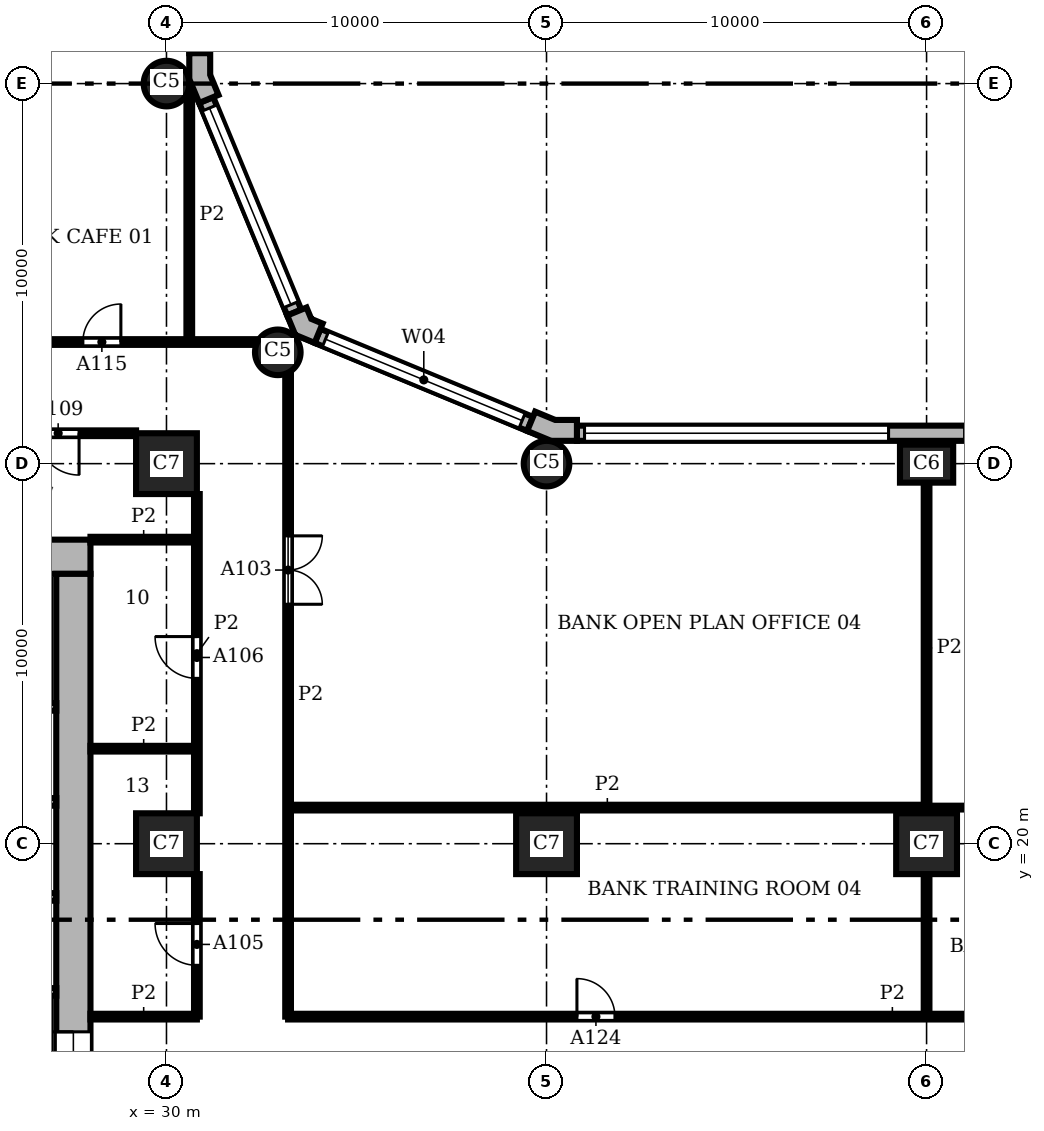
"""IFC4 building model, lengths in metres.
Left out: names, types, materials, properties, quantities, classifications, styles, units other than length and angle.
Written with IfcOpenShell. Run it as: python <this file> out.ifc"""

import sys

from ifc_helpers import new_model, si_unit, direction, frame, frame_2d, origin, origin_2d, place, context, subcontext, project, spatial, polyline, rectangle, circle, outline, extrude, element, fill, save


model = new_model("IFC4")
c1 = context("Model", 3, precision=1e-05, world=origin(), true_north=direction((0.0, 1.0)))
c2 = subcontext(c1, "Body", "Model", "MODEL_VIEW")
j1 = project(units=[si_unit("LENGTHUNIT", "METRE"), si_unit("PLANEANGLEUNIT", "RADIAN")], contexts=[c1])
p1 = place(None, origin())
s1 = spatial("IfcSite", under=j1, at=p1, CompositionType="ELEMENT")
p2 = place(p1, origin())
s2 = spatial("IfcBuilding", under=s1, at=p2, CompositionType="ELEMENT")
p3 = place(p2, frame((0.0, 0.0, 12.0)))
s3 = spatial("IfcBuildingStorey", under=s2, at=p3, CompositionType="ELEMENT", Elevation=12.0)
p4 = place(p3, frame((50.0, 30.0, 0.0), z_axis=(0.0, 0.0, 1.0), x_axis=(1.0, 0.0, 0.0)))
e1 = element("IfcColumn", 1, at=p4, inside=s3, PredefinedType="COLUMN", context=c2, shape_type="SweptSolid", body=[
    extrude(rectangle(XDim=1.4, YDim=1.0, at=origin_2d()), origin(), (0.0, 0.0, 1.0), 3.9),
])
for number, where, z_axis, x_axis in (
    (2, (40.0, 30.0, 0.0), (0.0, 0.0, 1.0), (1.0, 0.0, 0.0)),
    (3, (32.929, 32.929, 0.0), (0.0, 0.0, 1.0), (1.0, 0.0, 0.0)),
    (4, (30.0, 40.0, 0.0), (0.0, 0.0, 1.0), (1.0, 0.0, 0.0)),
):
    element("IfcColumn", number, at=place(p3, frame(where, z_axis=z_axis, x_axis=x_axis)), inside=s3, PredefinedType="COLUMN", context=c2, shape_type="SweptSolid", body=[
        extrude(circle(Radius=0.6, at=origin_2d()), origin(), (0.0, 0.0, 1.0), 3.9),
    ])
for number, where, z_axis, x_axis in (
    (5, (30.0, 20.0, 0.0), (0.0, 0.0, 1.0), (1.0, 0.0, 0.0)),
    (6, (30.0, 30.0, 0.0), (0.0, 0.0, 1.0), (1.0, 0.0, 0.0)),
    (7, (40.0, 20.0, 0.0), (0.0, 0.0, 1.0), (1.0, 0.0, 0.0)),
    (8, (50.0, 20.0, 0.0), (0.0, 0.0, 1.0), (1.0, 0.0, 0.0)),
):
    element("IfcColumn", number, at=place(p3, frame(where, z_axis=z_axis, x_axis=x_axis)), inside=s3, PredefinedType="COLUMN", context=c2, shape_type="SweptSolid", body=[
        extrude(rectangle(XDim=1.6, YDim=1.6, at=origin_2d()), origin(), (0.0, 0.0, 1.0), 3.9),
    ])
p5 = place(p3, frame((27.55, 8.9, 0.0), z_axis=(0.0, 0.0, 1.0), x_axis=(0.0, 1.0, 0.0)))
e9 = element("IfcWall", 9, at=p5, inside=s3, PredefinedType="SHEAR", context=c2, shape_type="SweptSolid", body=[
    extrude(rectangle(XDim=18.2, YDim=0.9, at=frame_2d((9.1, 0.0))), origin(), (0.0, 0.0, 1.0), 3.9),
])
p6 = place(p5, frame((4.55, 0.0, 0.0)))
e10 = element("IfcOpeningElement", 10, at=p6, cuts=e9, PredefinedType="OPENING", context=c2, shape_type="SweptSolid", body=[
    extrude(rectangle(XDim=1.6, YDim=2.1, at=frame_2d((0.8, 1.05))), frame((0.0, 0.46, 0.0), z_axis=(0.0, -1.0, 0.0), x_axis=(1.0, 0.0, 0.0)), (0.0, 0.0, 1.0), 0.92),
])
p7 = place(p3, frame((28.0, 27.55, 0.0), z_axis=(0.0, 0.0, 1.0), x_axis=(-1.0, 0.0, 0.0)))
e11 = element("IfcWall", 11, at=p7, inside=s3, PredefinedType="SHEAR", context=c2, shape_type="SweptSolid", body=[
    extrude(rectangle(XDim=20.0, YDim=0.9, at=frame_2d((10.0, 0.0))), origin(), (0.0, 0.0, 1.0), 3.9),
])
p8 = place(p3, origin())
e12 = element("IfcWall", 12, at=p8, inside=s3, PredefinedType="SOLIDWALL", context=c2, shape_type="SweptSolid", body=[
    extrude(outline(polyline([(40.8, 31.0), (40.8, 31.15), (40.229, 31.15), (39.701, 31.369), (39.644, 31.23), (39.49, 30.861), (40.119, 30.6), (40.8, 30.6), (40.8, 31.0)])), origin(), (0.0, 0.0, 1.0), 3.9),
])
e13 = element("IfcWall", 13, at=p8, inside=s3, PredefinedType="SOLIDWALL", context=c2, shape_type="SweptSolid", body=[
    extrude(outline(polyline([(34.051, 33.547), (34.108, 33.685), (33.809, 33.809), (33.685, 34.108), (33.547, 34.051), (33.177, 33.898), (33.388, 33.388), (33.898, 33.177), (34.051, 33.547)])), origin(), (0.0, 0.0, 1.0), 3.9),
])
e14 = element("IfcWall", 14, at=p8, inside=s3, PredefinedType="SOLIDWALL", context=c2, shape_type="SweptSolid", body=[
    extrude(outline(polyline([(31.23, 39.644), (31.369, 39.701), (31.15, 40.229), (31.15, 40.8), (31.0, 40.8), (30.6, 40.8), (30.6, 40.119), (30.861, 39.49), (31.23, 39.644)])), origin(), (0.0, 0.0, 1.0), 3.9),
])
p9 = place(p3, frame((69.2, 30.8, 0.0), z_axis=(0.0, 0.0, 1.0), x_axis=(-1.0, 0.0, 0.0)))
e15 = element("IfcWall", 15, at=p9, inside=s3, PredefinedType="SOLIDWALL", context=c2, shape_type="SweptSolid", body=[
    extrude(rectangle(XDim=28.4, YDim=0.4, at=frame_2d((14.2, 0.0))), origin(), (0.0, 0.0, 1.0), 3.9),
])
p10 = place(p9, frame((0.2, 0.0, 0.9)))
e16 = element("IfcOpeningElement", 16, at=p10, cuts=e15, PredefinedType="OPENING", context=c2, shape_type="SweptSolid", body=[
    extrude(rectangle(XDim=8.0, YDim=2.35, at=frame_2d((4.0, 1.175))), frame((0.0, 0.21, 0.0), z_axis=(0.0, -1.0, 0.0), x_axis=(1.0, 0.0, 0.0)), (0.0, 0.0, 1.0), 0.42),
])
p11 = place(p9, frame((10.2, 0.0, 0.9)))
e17 = element("IfcOpeningElement", 17, at=p11, cuts=e15, PredefinedType="OPENING", context=c2, shape_type="SweptSolid", body=[
    extrude(rectangle(XDim=8.0, YDim=2.35, at=frame_2d((4.0, 1.175))), frame((0.0, 0.21, 0.0), z_axis=(0.0, -1.0, 0.0), x_axis=(1.0, 0.0, 0.0)), (0.0, 0.0, 1.0), 0.42),
])
p12 = place(p9, frame((20.2, 0.0, 0.9)))
e18 = element("IfcOpeningElement", 18, at=p12, cuts=e15, PredefinedType="OPENING", context=c2, shape_type="SweptSolid", body=[
    extrude(rectangle(XDim=8.0, YDim=2.35, at=frame_2d((4.0, 1.175))), frame((0.0, 0.21, 0.0), z_axis=(0.0, -1.0, 0.0), x_axis=(1.0, 0.0, 0.0)), (0.0, 0.0, 1.0), 0.42),
])
p13 = place(p3, frame((39.567, 31.045, 0.0), z_axis=(0.0, 0.0, 1.0), x_axis=(-0.923891000409, 0.382655745237, 0.0)))
e19 = element("IfcWall", 19, at=p13, inside=s3, PredefinedType="SOLIDWALL", context=c2, shape_type="SweptSolid", body=[
    extrude(rectangle(XDim=6.053, YDim=0.4, at=frame_2d((3.027, 0.0))), origin(), (0.0, 0.0, 1.0), 3.9),
])
p14 = place(p13, frame((0.227, 0.0, 0.9)))
e20 = element("IfcOpeningElement", 20, at=p14, cuts=e19, PredefinedType="OPENING", context=c2, shape_type="SweptSolid", body=[
    extrude(rectangle(XDim=5.6, YDim=2.35, at=frame_2d((2.8, 1.175))), frame((0.0, 0.21, 0.0), z_axis=(0.0, -1.0, 0.0), x_axis=(1.0, 0.0, 0.0)), (0.0, 0.0, 1.0), 0.42),
])
p15 = place(p3, frame((33.362, 33.974, 0.0), z_axis=(0.0, 0.0, 1.0), x_axis=(-0.382655745237, 0.923891000409, 0.0)))
e21 = element("IfcWall", 21, at=p15, inside=s3, PredefinedType="SOLIDWALL", context=c2, shape_type="SweptSolid", body=[
    extrude(rectangle(XDim=6.053, YDim=0.4, at=frame_2d((3.027, 0.0))), origin(), (0.0, 0.0, 1.0), 3.9),
])
p16 = place(p15, frame((0.227, 0.0, 0.9)))
e22 = element("IfcOpeningElement", 22, at=p16, cuts=e21, PredefinedType="OPENING", context=c2, shape_type="SweptSolid", body=[
    extrude(rectangle(XDim=5.6, YDim=2.35, at=frame_2d((2.8, 1.175))), frame((0.0, 0.21, 0.0), z_axis=(0.0, -1.0, 0.0), x_axis=(1.0, 0.0, 0.0)), (0.0, 0.0, 1.0), 0.42),
])
p17 = place(p3, frame((30.8, 40.8, 0.0), z_axis=(0.0, 0.0, 1.0), x_axis=(0.0, 1.0, 0.0)))
e23 = element("IfcWall", 23, at=p17, inside=s3, PredefinedType="SOLIDWALL", context=c2, shape_type="SweptSolid", body=[
    extrude(rectangle(XDim=18.4, YDim=0.4, at=frame_2d((9.2, 0.0))), origin(), (0.0, 0.0, 1.0), 3.9),
])
p18 = place(p17, frame((0.2, 0.0, 0.9)))
e24 = element("IfcOpeningElement", 24, at=p18, cuts=e23, PredefinedType="OPENING", context=c2, shape_type="SweptSolid", body=[
    extrude(rectangle(XDim=8.0, YDim=2.35, at=frame_2d((4.0, 1.175))), frame((0.0, 0.21, 0.0), z_axis=(0.0, -1.0, 0.0), x_axis=(1.0, 0.0, 0.0)), (0.0, 0.0, 1.0), 0.42),
])
p19 = place(p17, frame((10.2, 0.0, 0.9)))
e25 = element("IfcOpeningElement", 25, at=p19, cuts=e23, PredefinedType="OPENING", context=c2, shape_type="SweptSolid", body=[
    extrude(rectangle(XDim=8.0, YDim=2.35, at=frame_2d((4.0, 1.175))), frame((0.0, 0.21, 0.0), z_axis=(0.0, -1.0, 0.0), x_axis=(1.0, 0.0, 0.0)), (0.0, 0.0, 1.0), 0.42),
])
for number, where, z_axis, x_axis in (
    (26, (24.3, 16.1, 0.0), (0.0, 0.0, 1.0), (1.0, 0.0, 0.0)),
    (27, (24.3, 18.6, 0.0), (0.0, 0.0, 1.0), (1.0, 0.0, 0.0)),
    (28, (24.3, 21.1, 0.0), (0.0, 0.0, 1.0), (1.0, 0.0, 0.0)),
):
    element("IfcWall", number, at=place(p3, frame(where, z_axis=z_axis, x_axis=x_axis)), inside=s3, PredefinedType="SHEAR", context=c2, shape_type="SweptSolid", body=[
        extrude(rectangle(XDim=2.8, YDim=0.2, at=frame_2d((1.4, 0.0))), origin(), (0.0, 0.0, 1.0), 3.58),
    ])
p20 = place(p3, frame((13.8, 23.6, 0.0), z_axis=(0.0, 0.0, 1.0), x_axis=(1.0, 0.0, 0.0)))
e29 = element("IfcWall", 29, at=p20, inside=s3, PredefinedType="SHEAR", context=c2, shape_type="SweptSolid", body=[
    extrude(rectangle(XDim=13.3, YDim=0.2, at=frame_2d((6.65, 0.0))), origin(), (0.0, 0.0, 1.0), 3.58),
])
p21 = place(p20, frame((2.4, 0.0, 0.0)))
e30 = element("IfcOpeningElement", 30, at=p21, cuts=e29, PredefinedType="OPENING", context=c2, shape_type="SweptSolid", body=[
    extrude(rectangle(XDim=1.1, YDim=2.1, at=frame_2d((0.55, 1.05))), frame((0.0, 0.11, 0.0), z_axis=(0.0, -1.0, 0.0), x_axis=(1.0, 0.0, 0.0)), (0.0, 0.0, 1.0), 0.22),
])
p22 = place(p20, frame((4.9, 0.0, 0.0)))
e31 = element("IfcOpeningElement", 31, at=p22, cuts=e29, PredefinedType="OPENING", context=c2, shape_type="SweptSolid", body=[
    extrude(rectangle(XDim=1.1, YDim=2.1, at=frame_2d((0.55, 1.05))), frame((0.0, 0.11, 0.0), z_axis=(0.0, -1.0, 0.0), x_axis=(1.0, 0.0, 0.0)), (0.0, 0.0, 1.0), 0.22),
])
p23 = place(p20, frame((0.25, 0.0, 0.0)))
e32 = element("IfcOpeningElement", 32, at=p23, cuts=e29, PredefinedType="OPENING", context=c2, shape_type="SweptSolid", body=[
    extrude(rectangle(XDim=1.0, YDim=2.1, at=frame_2d((0.5, 1.05))), frame((0.0, 0.11, 0.0), z_axis=(0.0, -1.0, 0.0), x_axis=(1.0, 0.0, 0.0)), (0.0, 0.0, 1.0), 0.22),
])
p24 = place(p3, frame((50.0, 20.95, 0.0), z_axis=(0.0, 0.0, 1.0), x_axis=(1.0, 0.0, 0.0)))
e33 = element("IfcWall", 33, at=p24, inside=s3, PredefinedType="PARTITIONING", context=c2, shape_type="SweptSolid", body=[
    extrude(rectangle(XDim=10.0, YDim=0.1, at=frame_2d((5.0, 0.0))), origin(), (0.0, 0.0, 1.0), 3.58),
])
p25 = place(p24, frame((4.625, 0.0, 0.0)))
e34 = element("IfcOpeningElement", 34, at=p25, cuts=e33, PredefinedType="OPENING", context=c2, shape_type="SweptSolid", body=[
    extrude(rectangle(XDim=0.95, YDim=2.1, at=frame_2d((0.475, 1.05))), frame((0.0, 0.06, 0.0), z_axis=(0.0, -1.0, 0.0), x_axis=(1.0, 0.0, 0.0)), (0.0, 0.0, 1.0), 0.12),
])
p26 = place(p3, frame((30.6, 33.2, 0.0), z_axis=(0.0, 0.0, 1.0), x_axis=(0.0, 1.0, 0.0)))
e35 = element("IfcWall", 35, at=p26, inside=s3, PredefinedType="PARTITIONING", context=c2, shape_type="SweptSolid", body=[
    extrude(rectangle(XDim=6.699, YDim=0.15, at=frame_2d((3.35, 0.0))), origin(), (0.0, 0.0, 1.0), 3.58),
])
p27 = place(p3, frame((30.8, 15.45, 0.0), z_axis=(0.0, 0.0, 1.0), x_axis=(0.0, 1.0, 0.0)))
e36 = element("IfcWall", 36, at=p27, inside=s3, PredefinedType="PARTITIONING", context=c2, shape_type="SweptSolid", body=[
    extrude(rectangle(XDim=3.75, YDim=0.15, at=frame_2d((1.875, 0.0))), origin(), (0.0, 0.0, 1.0), 3.58),
])
p28 = place(p27, frame((1.35, 0.0, 0.0)))
e37 = element("IfcOpeningElement", 37, at=p28, cuts=e36, PredefinedType="OPENING", context=c2, shape_type="SweptSolid", body=[
    extrude(rectangle(XDim=1.1, YDim=2.1, at=frame_2d((0.55, 1.05))), frame((0.0, 0.085, 0.0), z_axis=(0.0, -1.0, 0.0), x_axis=(1.0, 0.0, 0.0)), (0.0, 0.0, 1.0), 0.17),
])
p29 = place(p3, frame((30.8, 20.8, 0.0), z_axis=(0.0, 0.0, 1.0), x_axis=(0.0, 1.0, 0.0)))
e38 = element("IfcWall", 38, at=p29, inside=s3, PredefinedType="PARTITIONING", context=c2, shape_type="SweptSolid", body=[
    extrude(rectangle(XDim=8.4, YDim=0.15, at=frame_2d((4.2, 0.0))), origin(), (0.0, 0.0, 1.0), 3.58),
])
p30 = place(p29, frame((3.55, 0.0, 0.0)))
e39 = element("IfcOpeningElement", 39, at=p30, cuts=e38, PredefinedType="OPENING", context=c2, shape_type="SweptSolid", body=[
    extrude(rectangle(XDim=1.1, YDim=2.1, at=frame_2d((0.55, 1.05))), frame((0.0, 0.085, 0.0), z_axis=(0.0, -1.0, 0.0), x_axis=(1.0, 0.0, 0.0)), (0.0, 0.0, 1.0), 0.17),
])
p31 = place(p3, frame((33.2, 15.45, 0.0), z_axis=(0.0, 0.0, 1.0), x_axis=(0.0, 1.0, 0.0)))
e40 = element("IfcWall", 40, at=p31, inside=s3, PredefinedType="PARTITIONING", context=c2, shape_type="SweptSolid", body=[
    extrude(rectangle(XDim=16.912, YDim=0.15, at=frame_2d((8.456, 0.0))), origin(), (0.0, 0.0, 1.0), 3.58),
])
p32 = place(p31, frame((10.85, 0.0, 0.0)))
e41 = element("IfcOpeningElement", 41, at=p32, cuts=e40, PredefinedType="OPENING", context=c2, shape_type="SweptSolid", body=[
    extrude(rectangle(XDim=1.8, YDim=2.1, at=frame_2d((0.9, 1.05))), frame((0.0, 0.085, 0.0), z_axis=(0.0, -1.0, 0.0), x_axis=(1.0, 0.0, 0.0)), (0.0, 0.0, 1.0), 0.17),
])
p33 = place(p3, frame((50.0, 15.45, 0.0), z_axis=(0.0, 0.0, 1.0), x_axis=(0.0, 1.0, 0.0)))
e42 = element("IfcWall", 42, at=p33, inside=s3, PredefinedType="PARTITIONING", context=c2, shape_type="SweptSolid", body=[
    extrude(rectangle(XDim=3.75, YDim=0.15, at=frame_2d((1.875, 0.0))), origin(), (0.0, 0.0, 1.0), 3.58),
])
p34 = place(p3, frame((50.0, 20.8, 0.0), z_axis=(0.0, 0.0, 1.0), x_axis=(0.0, 1.0, 0.0)))
e43 = element("IfcWall", 43, at=p34, inside=s3, PredefinedType="PARTITIONING", context=c2, shape_type="SweptSolid", body=[
    extrude(rectangle(XDim=8.7, YDim=0.15, at=frame_2d((4.35, 0.0))), origin(), (0.0, 0.0, 1.0), 3.58),
])
p35 = place(p3, frame((28.0, 15.45, 0.0), z_axis=(0.0, 0.0, 1.0), x_axis=(1.0, 0.0, 0.0)))
e44 = element("IfcWall", 44, at=p35, inside=s3, PredefinedType="PARTITIONING", context=c2, shape_type="SweptSolid", body=[
    extrude(rectangle(XDim=2.8, YDim=0.15, at=frame_2d((1.4, 0.0))), origin(), (0.0, 0.0, 1.0), 3.58),
])
p36 = place(p3, frame((33.2, 15.45, 0.0), z_axis=(0.0, 0.0, 1.0), x_axis=(1.0, 0.0, 0.0)))
e45 = element("IfcWall", 45, at=p36, inside=s3, PredefinedType="PARTITIONING", context=c2, shape_type="SweptSolid", body=[
    extrude(rectangle(XDim=31.8, YDim=0.15, at=frame_2d((15.9, 0.0))), origin(), (0.0, 0.0, 1.0), 3.58),
])
p37 = place(p36, frame((7.6, 0.0, 0.0)))
e46 = element("IfcOpeningElement", 46, at=p37, cuts=e45, PredefinedType="OPENING", context=c2, shape_type="SweptSolid", body=[
    extrude(rectangle(XDim=1.0, YDim=2.1, at=frame_2d((0.5, 1.05))), frame((0.0, 0.085, 0.0), z_axis=(0.0, -1.0, 0.0), x_axis=(1.0, 0.0, 0.0)), (0.0, 0.0, 1.0), 0.17),
])
p38 = place(p36, frame((21.9, 0.0, 0.0)))
e47 = element("IfcOpeningElement", 47, at=p38, cuts=e45, PredefinedType="OPENING", context=c2, shape_type="SweptSolid", body=[
    extrude(rectangle(XDim=1.0, YDim=2.1, at=frame_2d((0.5, 1.05))), frame((0.0, 0.085, 0.0), z_axis=(0.0, -1.0, 0.0), x_axis=(1.0, 0.0, 0.0)), (0.0, 0.0, 1.0), 0.17),
])
p39 = place(p3, frame((33.2, 20.95, 0.0), z_axis=(0.0, 0.0, 1.0), x_axis=(1.0, 0.0, 0.0)))
e48 = element("IfcWall", 48, at=p39, inside=s3, PredefinedType="PARTITIONING", context=c2, shape_type="SweptSolid", body=[
    extrude(rectangle(XDim=16.8, YDim=0.15, at=frame_2d((8.4, 0.0))), origin(), (0.0, 0.0, 1.0), 3.58),
])
for number, where, z_axis, x_axis in (
    (49, (28.0, 22.5, 0.0), (0.0, 0.0, 1.0), (1.0, 0.0, 0.0)),
    (50, (28.0, 28.0, 0.0), (0.0, 0.0, 1.0), (1.0, 0.0, 0.0)),
):
    element("IfcWall", number, at=place(p3, frame(where, z_axis=z_axis, x_axis=x_axis)), inside=s3, PredefinedType="PARTITIONING", context=c2, shape_type="SweptSolid", body=[
        extrude(rectangle(XDim=2.8, YDim=0.15, at=frame_2d((1.4, 0.0))), origin(), (0.0, 0.0, 1.0), 3.58),
    ])
p40 = place(p3, frame((20.8, 30.8, 0.0), z_axis=(0.0, 0.0, 1.0), x_axis=(1.0, 0.0, 0.0)))
e51 = element("IfcWall", 51, at=p40, inside=s3, PredefinedType="PARTITIONING", context=c2, shape_type="SweptSolid", body=[
    extrude(rectangle(XDim=8.4, YDim=0.15, at=frame_2d((4.2, 0.0))), origin(), (0.0, 0.0, 1.0), 3.58),
])
p41 = place(p40, frame((1.4, 0.0, 0.0)))
e52 = element("IfcOpeningElement", 52, at=p41, cuts=e51, PredefinedType="OPENING", context=c2, shape_type="SweptSolid", body=[
    extrude(rectangle(XDim=0.8, YDim=2.1, at=frame_2d((0.4, 1.05))), frame((0.0, 0.085, 0.0), z_axis=(0.0, -1.0, 0.0), x_axis=(1.0, 0.0, 0.0)), (0.0, 0.0, 1.0), 0.17),
])
p42 = place(p40, frame((5.8, 0.0, 0.0)))
e53 = element("IfcOpeningElement", 53, at=p42, cuts=e51, PredefinedType="OPENING", context=c2, shape_type="SweptSolid", body=[
    extrude(rectangle(XDim=1.1, YDim=2.1, at=frame_2d((0.55, 1.05))), frame((0.0, 0.085, 0.0), z_axis=(0.0, -1.0, 0.0), x_axis=(1.0, 0.0, 0.0)), (0.0, 0.0, 1.0), 0.17),
])
p43 = place(p3, frame((16.2, 33.2, 0.0), z_axis=(0.0, 0.0, 1.0), x_axis=(1.0, 0.0, 0.0)))
e54 = element("IfcWall", 54, at=p43, inside=s3, PredefinedType="PARTITIONING", context=c2, shape_type="SweptSolid", body=[
    extrude(rectangle(XDim=16.162, YDim=0.15, at=frame_2d((8.081, 0.0))), origin(), (0.0, 0.0, 1.0), 3.58),
])
p44 = place(p43, frame((11.6, 0.0, 0.0)))
e55 = element("IfcOpeningElement", 55, at=p44, cuts=e54, PredefinedType="OPENING", context=c2, shape_type="SweptSolid", body=[
    extrude(rectangle(XDim=1.0, YDim=2.1, at=frame_2d((0.5, 1.05))), frame((0.0, 0.085, 0.0), z_axis=(0.0, -1.0, 0.0), x_axis=(1.0, 0.0, 0.0)), (0.0, 0.0, 1.0), 0.17),
])
p45 = place(p12, origin())
e56 = element("IfcWindow", 56, at=p45, inside=s3, PartitioningType="SINGLE_PANEL", PredefinedType="WINDOW", context=c2, shape_type="SweptSolid", body=[
    extrude(rectangle(XDim=8.0, YDim=2.35, at=frame_2d((4.0, 1.175))), frame((0.0, 0.16, 0.0), z_axis=(0.0, -1.0, 0.0), x_axis=(1.0, 0.0, 0.0)), (0.0, 0.0, 1.0), 0.06),
])
fill(e18, e56)
p46 = place(p14, origin())
e57 = element("IfcWindow", 57, at=p46, inside=s3, PartitioningType="SINGLE_PANEL", PredefinedType="WINDOW", context=c2, shape_type="SweptSolid", body=[
    extrude(rectangle(XDim=5.6, YDim=2.35, at=frame_2d((2.8, 1.175))), frame((0.0, 0.16, 0.0), z_axis=(0.0, -1.0, 0.0), x_axis=(1.0, 0.0, 0.0)), (0.0, 0.0, 1.0), 0.06),
])
fill(e20, e57)
p47 = place(p16, origin())
e58 = element("IfcWindow", 58, at=p47, inside=s3, PartitioningType="SINGLE_PANEL", PredefinedType="WINDOW", context=c2, shape_type="SweptSolid", body=[
    extrude(rectangle(XDim=5.6, YDim=2.35, at=frame_2d((2.8, 1.175))), frame((0.0, 0.16, 0.0), z_axis=(0.0, -1.0, 0.0), x_axis=(1.0, 0.0, 0.0)), (0.0, 0.0, 1.0), 0.06),
])
fill(e22, e58)
p48 = place(p6, origin())
e59 = element("IfcDoor", 59, at=p48, inside=s3, OperationType="DOUBLE_DOOR_SINGLE_SWING", PredefinedType="DOOR", context=c2, shape_type="SweptSolid", body=[
    extrude(rectangle(XDim=1.6, YDim=2.1, at=frame_2d((0.8, 1.05))), frame((0.0, 0.025, 0.0), z_axis=(0.0, -1.0, 0.0), x_axis=(1.0, 0.0, 0.0)), (0.0, 0.0, 1.0), 0.05),
])
fill(e10, e59)
p49 = place(p32, frame((1.8, 0.0, 0.0), z_axis=(0.0, 0.0, 1.0), x_axis=(-1.0, 0.0, 0.0)))
e60 = element("IfcDoor", 60, at=p49, inside=s3, OperationType="DOUBLE_DOOR_SINGLE_SWING", PredefinedType="DOOR", context=c2, shape_type="SweptSolid", body=[
    extrude(rectangle(XDim=1.8, YDim=2.1, at=frame_2d((0.9, 1.05))), frame((0.0, 0.025, 0.0), z_axis=(0.0, -1.0, 0.0), x_axis=(1.0, 0.0, 0.0)), (0.0, 0.0, 1.0), 0.05),
])
fill(e41, e60)
p50 = place(p28, origin())
e61 = element("IfcDoor", 61, at=p50, inside=s3, OperationType="SINGLE_SWING_RIGHT", PredefinedType="DOOR", context=c2, shape_type="SweptSolid", body=[
    extrude(rectangle(XDim=1.1, YDim=2.1, at=frame_2d((0.55, 1.05))), frame((0.0, 0.025, 0.0), z_axis=(0.0, -1.0, 0.0), x_axis=(1.0, 0.0, 0.0)), (0.0, 0.0, 1.0), 0.05),
])
fill(e37, e61)
p51 = place(p30, origin())
e62 = element("IfcDoor", 62, at=p51, inside=s3, OperationType="SINGLE_SWING_RIGHT", PredefinedType="DOOR", context=c2, shape_type="SweptSolid", body=[
    extrude(rectangle(XDim=1.1, YDim=2.1, at=frame_2d((0.55, 1.05))), frame((0.0, 0.025, 0.0), z_axis=(0.0, -1.0, 0.0), x_axis=(1.0, 0.0, 0.0)), (0.0, 0.0, 1.0), 0.05),
])
fill(e39, e62)
p52 = place(p42, frame((1.1, 0.0, 0.0), z_axis=(0.0, 0.0, 1.0), x_axis=(-1.0, 0.0, 0.0)))
e63 = element("IfcDoor", 63, at=p52, inside=s3, OperationType="SINGLE_SWING_LEFT", PredefinedType="DOOR", context=c2, shape_type="SweptSolid", body=[
    extrude(rectangle(XDim=1.1, YDim=2.1, at=frame_2d((0.55, 1.05))), frame((0.0, 0.025, 0.0), z_axis=(0.0, -1.0, 0.0), x_axis=(1.0, 0.0, 0.0)), (0.0, 0.0, 1.0), 0.05),
])
fill(e53, e63)
p53 = place(p44, origin())
e64 = element("IfcDoor", 64, at=p53, inside=s3, OperationType="SINGLE_SWING_RIGHT", PredefinedType="DOOR", context=c2, shape_type="SweptSolid", body=[
    extrude(rectangle(XDim=1.0, YDim=2.1, at=frame_2d((0.5, 1.05))), frame((0.0, 0.025, 0.0), z_axis=(0.0, -1.0, 0.0), x_axis=(1.0, 0.0, 0.0)), (0.0, 0.0, 1.0), 0.05),
])
fill(e55, e64)
p54 = place(p37, origin())
e65 = element("IfcDoor", 65, at=p54, inside=s3, OperationType="SINGLE_SWING_LEFT", PredefinedType="DOOR", context=c2, shape_type="SweptSolid", body=[
    extrude(rectangle(XDim=1.0, YDim=2.1, at=frame_2d((0.5, 1.05))), frame((0.0, 0.025, 0.0), z_axis=(0.0, -1.0, 0.0), x_axis=(1.0, 0.0, 0.0)), (0.0, 0.0, 1.0), 0.05),
])
fill(e46, e65)
save(model, sys.argv[1])
